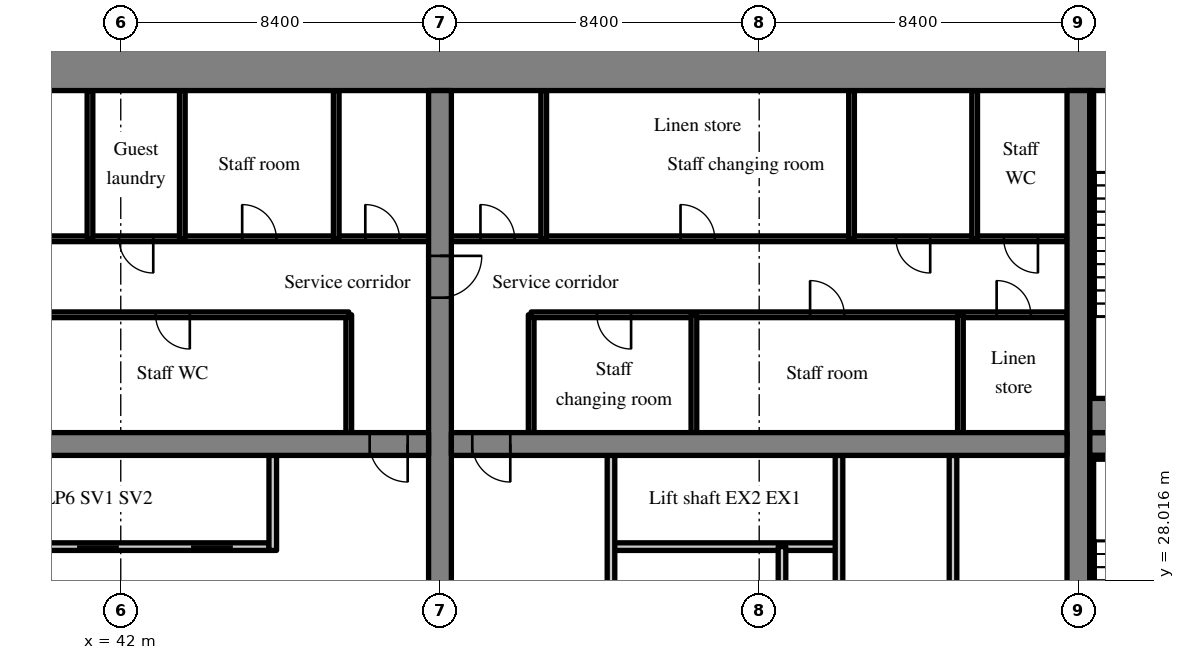
"""IFC4 building model, lengths in metres.
Left out: names, types, materials, properties, quantities, classifications, styles, units other than length and angle.
Written with IfcOpenShell. Run it as: python <this file> out.ifc"""

import sys

from ifc_helpers import new_model, si_unit, direction, frame, frame_2d, origin, place, context, subcontext, project, spatial, rectangle, extrude, source, transform, mapped, element, fill, save


model = new_model("IFC4")
c1 = context("Model", 3, precision=1e-05, world=origin(), true_north=direction((0.0, 1.0)))
c2 = subcontext(c1, "Body", "Model", "MODEL_VIEW")
j1 = project(units=[si_unit("LENGTHUNIT", "METRE"), si_unit("PLANEANGLEUNIT", "RADIAN")], contexts=[c1])
p1 = place(None, origin())
s1 = spatial("IfcSite", under=j1, at=p1, CompositionType="ELEMENT")
p2 = place(p1, origin())
s2 = spatial("IfcBuilding", under=s1, at=p2, CompositionType="ELEMENT")
p3 = place(p2, frame((0.0, 0.0, 11.4)))
s3 = spatial("IfcBuildingStorey", under=s2, at=p3, CompositionType="ELEMENT", Elevation=11.4)
m1 = source(origin(), c2, "Body", "SweptSolid", [
    extrude(rectangle(XDim=50.4, YDim=1.1, at=frame_2d((25.2, 0.0))), origin(), (0.0, 0.0, 1.0), 6.32),
])
p4 = place(p3, frame((25.2, 41.45, 0.0), z_axis=(0.0, 0.0, 1.0), x_axis=(1.0, 0.0, 0.0)))
e1 = element("IfcWall", 1, at=p4, inside=s3, PredefinedType="SHEAR", context=c2, shape_type="MappedRepresentation", body=[
    mapped(m1, transform((0.0, 0.0, 0.0), scale=1.0)),
])
m2 = source(origin(), c2, "Body", "SweptSolid", [
    extrude(rectangle(XDim=17.8, YDim=0.6, at=frame_2d((8.9, 0.0))), origin(), (0.0, 0.0, 1.0), 6.32),
])
p5 = place(p3, frame((50.4, 23.1, 0.0), z_axis=(0.0, 0.0, 1.0), x_axis=(0.0, 1.0, 0.0)))
e2 = element("IfcWall", 2, at=p5, inside=s3, PredefinedType="SHEAR", context=c2, shape_type="MappedRepresentation", body=[
    mapped(m2, transform((0.0, 0.0, 0.0), scale=1.0)),
])
m3 = source(origin(), c2, "Body", "SweptSolid", [
    extrude(rectangle(XDim=1.1, YDim=2.1, at=frame_2d((0.55, 1.05))), frame((0.0, 0.31, 0.0), z_axis=(0.0, -1.0, 0.0), x_axis=(1.0, 0.0, 0.0)), (0.0, 0.0, 1.0), 0.62),
])
p6 = place(p5, frame((12.35, 0.0, 0.0)))
e3 = element("IfcOpeningElement", 3, at=p6, cuts=e2, PredefinedType="OPENING", context=c2, shape_type="MappedRepresentation", body=[
    mapped(m3, transform((0.0, 0.0, 0.0), scale=1.0)),
])
p7 = place(p3, frame((67.2, 23.1, 0.0), z_axis=(0.0, 0.0, 1.0), x_axis=(0.0, 1.0, 0.0)))
e4 = element("IfcWall", 4, at=p7, inside=s3, PredefinedType="SHEAR", context=c2, shape_type="MappedRepresentation", body=[
    mapped(m2, transform((0.0, 0.0, 0.0), scale=1.0)),
])
m4 = source(origin(), c2, "Body", "SweptSolid", [
    extrude(rectangle(XDim=16.2, YDim=0.6, at=frame_2d((8.1, 0.0))), origin(), (0.0, 0.0, 1.0), 6.32),
])
p8 = place(p3, frame((33.9, 31.6, 0.0), z_axis=(0.0, 0.0, 1.0), x_axis=(1.0, 0.0, 0.0)))
e5 = element("IfcWall", 5, at=p8, inside=s3, PredefinedType="SHEAR", context=c2, shape_type="MappedRepresentation", body=[
    mapped(m4, transform((0.0, 0.0, 0.0), scale=1.0)),
])
m5 = source(origin(), c2, "Body", "SweptSolid", [
    extrude(rectangle(XDim=1.0, YDim=2.1, at=frame_2d((0.5, 1.05))), frame((0.0, 0.31, 0.0), z_axis=(0.0, -1.0, 0.0), x_axis=(1.0, 0.0, 0.0)), (0.0, 0.0, 1.0), 0.62),
])
p9 = place(p8, frame((14.65, 0.0, 0.0)))
e6 = element("IfcOpeningElement", 6, at=p9, cuts=e5, PredefinedType="OPENING", context=c2, shape_type="MappedRepresentation", body=[
    mapped(m5, transform((0.0, 0.0, 0.0), scale=1.0)),
])
m6 = source(origin(), c2, "Body", "SweptSolid", [
    extrude(rectangle(XDim=16.2, YDim=0.6, at=frame_2d((8.1, 0.0))), origin(), (0.0, 0.0, 1.0), 6.32),
])
p10 = place(p3, frame((50.7, 31.6, 0.0), z_axis=(0.0, 0.0, 1.0), x_axis=(1.0, 0.0, 0.0)))
e7 = element("IfcWall", 7, at=p10, inside=s3, PredefinedType="SHEAR", context=c2, shape_type="MappedRepresentation", body=[
    mapped(m6, transform((0.0, 0.0, 0.0), scale=1.0)),
])
p11 = place(p10, frame((0.55, 0.0, 0.0)))
e8 = element("IfcOpeningElement", 8, at=p11, cuts=e7, PredefinedType="OPENING", context=c2, shape_type="MappedRepresentation", body=[
    mapped(m5, transform((0.0, 0.0, 0.0), scale=1.0)),
])
m7 = source(origin(), c2, "Body", "SweptSolid", [
    extrude(rectangle(XDim=7.0, YDim=0.6, at=frame_2d((3.5, 0.0))), origin(), (0.0, 0.0, 1.0), 6.32),
])
p12 = place(p3, frame((67.5, 31.6, 0.0), z_axis=(0.0, 0.0, 1.0), x_axis=(1.0, 0.0, 0.0)))
e9 = element("IfcWall", 9, at=p12, inside=s3, PredefinedType="SHEAR", context=c2, shape_type="MappedRepresentation", body=[
    mapped(m7, transform((0.0, 0.0, 0.0), scale=1.0)),
])
p13 = place(p12, frame((5.425, 0.0, 0.0)))
e10 = element("IfcOpeningElement", 10, at=p13, cuts=e9, PredefinedType="OPENING", context=c2, shape_type="MappedRepresentation", body=[
    mapped(m3, transform((0.0, 0.0, 0.0), scale=1.0)),
])
m8 = source(origin(), c2, "Body", "SweptSolid", [
    extrude(rectangle(XDim=12.0, YDim=0.2, at=frame_2d((6.0, 0.0))), origin(), (0.0, 0.0, 1.0), 6.32),
])
p14 = place(p3, frame((33.9, 28.9, 0.0), z_axis=(0.0, 0.0, 1.0), x_axis=(1.0, 0.0, 0.0)))
e11 = element("IfcWall", 11, at=p14, inside=s3, PredefinedType="SOLIDWALL", context=c2, shape_type="MappedRepresentation", body=[
    mapped(m8, transform((0.0, 0.0, 0.0), scale=1.0)),
])
m9 = source(origin(), c2, "Body", "SweptSolid", [
    extrude(rectangle(XDim=1.1, YDim=2.1, at=frame_2d((0.55, 1.05))), frame((0.0, 0.11, 0.0), z_axis=(0.0, -1.0, 0.0), x_axis=(1.0, 0.0, 0.0)), (0.0, 0.0, 1.0), 0.22),
])
p15 = place(p14, frame((0.95, 0.0, 0.0)))
e12 = element("IfcOpeningElement", 12, at=p15, cuts=e11, PredefinedType="OPENING", context=c2, shape_type="MappedRepresentation", body=[
    mapped(m9, transform((0.0, 0.0, 0.0), scale=1.0)),
])
p16 = place(p14, frame((3.95, 0.0, 0.0)))
e13 = element("IfcOpeningElement", 13, at=p16, cuts=e11, PredefinedType="OPENING", context=c2, shape_type="MappedRepresentation", body=[
    mapped(m9, transform((0.0, 0.0, 0.0), scale=1.0)),
])
p17 = place(p14, frame((6.95, 0.0, 0.0)))
e14 = element("IfcOpeningElement", 14, at=p17, cuts=e11, PredefinedType="OPENING", context=c2, shape_type="MappedRepresentation", body=[
    mapped(m9, transform((0.0, 0.0, 0.0), scale=1.0)),
])
p18 = place(p14, frame((9.95, 0.0, 0.0)))
e15 = element("IfcOpeningElement", 15, at=p18, cuts=e11, PredefinedType="OPENING", context=c2, shape_type="MappedRepresentation", body=[
    mapped(m9, transform((0.0, 0.0, 0.0), scale=1.0)),
])
m10 = source(origin(), c2, "Body", "SweptSolid", [
    extrude(rectangle(XDim=2.5, YDim=0.2, at=frame_2d((1.25, 0.0))), origin(), (0.0, 0.0, 1.0), 6.32),
])
p19 = place(p3, frame((46.0, 28.8, 0.0), z_axis=(0.0, 0.0, 1.0), x_axis=(0.0, 1.0, 0.0)))
e16 = element("IfcWall", 16, at=p19, inside=s3, PredefinedType="SOLIDWALL", context=c2, shape_type="MappedRepresentation", body=[
    mapped(m10, transform((0.0, 0.0, 0.0), scale=1.0)),
])
m11 = source(origin(), c2, "Body", "SweptSolid", [
    extrude(rectangle(XDim=3.1, YDim=0.15, at=frame_2d((1.55, 0.0))), origin(), (0.0, 0.0, 1.0), 6.32),
])
p20 = place(p3, frame((48.0, 31.9, 0.0), z_axis=(0.0, 0.0, 1.0), x_axis=(0.0, 1.0, 0.0)))
e17 = element("IfcWall", 17, at=p20, inside=s3, PredefinedType="PARTITIONING", context=c2, shape_type="MappedRepresentation", body=[
    mapped(m11, transform((0.0, 0.0, 0.0), scale=1.0)),
])
m12 = source(origin(), c2, "Body", "SweptSolid", [
    extrude(rectangle(XDim=14.1, YDim=0.15, at=frame_2d((7.05, 0.0))), origin(), (0.0, 0.0, 1.0), 6.32),
])
p21 = place(p3, frame((33.9, 35.0, 0.0), z_axis=(0.0, 0.0, 1.0), x_axis=(1.0, 0.0, 0.0)))
e18 = element("IfcWall", 18, at=p21, inside=s3, PredefinedType="PARTITIONING", context=c2, shape_type="MappedRepresentation", body=[
    mapped(m12, transform((0.0, 0.0, 0.0), scale=1.0)),
])
m13 = source(origin(), c2, "Body", "SweptSolid", [
    extrude(rectangle(XDim=0.9, YDim=2.1, at=frame_2d((0.45, 1.05))), frame((0.0, 0.085, 0.0), z_axis=(0.0, -1.0, 0.0), x_axis=(1.0, 0.0, 0.0)), (0.0, 0.0, 1.0), 0.17),
])
p22 = place(p21, frame((2.004, 0.0, 0.0)))
e19 = element("IfcOpeningElement", 19, at=p22, cuts=e18, PredefinedType="OPENING", context=c2, shape_type="MappedRepresentation", body=[
    mapped(m13, transform((0.0, 0.0, 0.0), scale=1.0)),
])
p23 = place(p21, frame((9.017, 0.0, 0.0)))
e20 = element("IfcOpeningElement", 20, at=p23, cuts=e18, PredefinedType="OPENING", context=c2, shape_type="MappedRepresentation", body=[
    mapped(m13, transform((0.0, 0.0, 0.0), scale=1.0)),
])
m14 = source(origin(), c2, "Body", "SweptSolid", [
    extrude(rectangle(XDim=16.2, YDim=0.15, at=frame_2d((8.1, 0.0))), origin(), (0.0, 0.0, 1.0), 6.32),
])
p24 = place(p3, frame((33.9, 37.0, 0.0), z_axis=(0.0, 0.0, 1.0), x_axis=(1.0, 0.0, 0.0)))
e21 = element("IfcWall", 21, at=p24, inside=s3, PredefinedType="PARTITIONING", context=c2, shape_type="MappedRepresentation", body=[
    mapped(m14, transform((0.0, 0.0, 0.0), scale=1.0)),
])
p25 = place(p24, frame((3.195, 0.0, 0.0)))
e22 = element("IfcOpeningElement", 22, at=p25, cuts=e21, PredefinedType="OPENING", context=c2, shape_type="MappedRepresentation", body=[
    mapped(m13, transform((0.0, 0.0, 0.0), scale=1.0)),
])
p26 = place(p24, frame((8.055, 0.0, 0.0)))
e23 = element("IfcOpeningElement", 23, at=p26, cuts=e21, PredefinedType="OPENING", context=c2, shape_type="MappedRepresentation", body=[
    mapped(m13, transform((0.0, 0.0, 0.0), scale=1.0)),
])
p27 = place(p24, frame((11.295, 0.0, 0.0)))
e24 = element("IfcOpeningElement", 24, at=p27, cuts=e21, PredefinedType="OPENING", context=c2, shape_type="MappedRepresentation", body=[
    mapped(m13, transform((0.0, 0.0, 0.0), scale=1.0)),
])
p28 = place(p24, frame((14.535, 0.0, 0.0)))
e25 = element("IfcOpeningElement", 25, at=p28, cuts=e21, PredefinedType="OPENING", context=c2, shape_type="MappedRepresentation", body=[
    mapped(m13, transform((0.0, 0.0, 0.0), scale=1.0)),
])
m15 = source(origin(), c2, "Body", "SweptSolid", [
    extrude(rectangle(XDim=3.9, YDim=0.15, at=frame_2d((1.95, 0.0))), origin(), (0.0, 0.0, 1.0), 6.32),
])
for number, where, z_axis, x_axis in (
    (26, (41.19, 37.0, 0.0), (0.0, 0.0, 1.0), (0.0, 1.0, 0.0)),
    (27, (43.62, 37.0, 0.0), (0.0, 0.0, 1.0), (0.0, 1.0, 0.0)),
    (28, (47.67, 37.0, 0.0), (0.0, 0.0, 1.0), (0.0, 1.0, 0.0)),
):
    element("IfcWall", number, at=place(p3, frame(where, z_axis=z_axis, x_axis=x_axis)), inside=s3, PredefinedType="PARTITIONING", context=c2, shape_type="MappedRepresentation", body=[
        mapped(m15, transform((0.0, 0.0, 0.0), scale=1.0)),
    ])
m16 = source(origin(), c2, "Body", "SweptSolid", [
    extrude(rectangle(XDim=6.0, YDim=0.2, at=frame_2d((3.0, 0.0))), origin(), (0.0, 0.0, 1.0), 6.32),
])
p29 = place(p3, frame((60.9, 28.9, 0.0), z_axis=(0.0, 0.0, 1.0), x_axis=(-1.0, 0.0, 0.0)))
e29 = element("IfcWall", 29, at=p29, inside=s3, PredefinedType="SOLIDWALL", context=c2, shape_type="MappedRepresentation", body=[
    mapped(m16, transform((0.0, 0.0, 0.0), scale=1.0)),
])
m17 = source(origin(), c2, "Body", "SweptSolid", [
    extrude(rectangle(XDim=8.2, YDim=0.2, at=frame_2d((4.1, 0.0))), origin(), (0.0, 0.0, 1.0), 6.32),
])
for number, where, z_axis, x_axis in (
    (30, (54.9, 23.1, 0.0), (0.0, 0.0, 1.0), (0.0, 1.0, 0.0)),
    (31, (60.9, 23.1, 0.0), (0.0, 0.0, 1.0), (0.0, 1.0, 0.0)),
):
    element("IfcWall", number, at=place(p3, frame(where, z_axis=z_axis, x_axis=x_axis)), inside=s3, PredefinedType="PARTITIONING", context=c2, shape_type="MappedRepresentation", body=[
        mapped(m17, transform((0.0, 0.0, 0.0), scale=1.0)),
    ])
m18 = source(origin(), c2, "Body", "SweptSolid", [
    extrude(rectangle(XDim=5.8, YDim=0.2, at=frame_2d((2.9, 0.0))), origin(), (0.0, 0.0, 1.0), 6.32),
])
p30 = place(p3, frame((59.4, 23.1, 0.0), z_axis=(0.0, 0.0, 1.0), x_axis=(0.0, 1.0, 0.0)))
e32 = element("IfcWall", 32, at=p30, inside=s3, PredefinedType="PARTITIONING", context=c2, shape_type="MappedRepresentation", body=[
    mapped(m18, transform((0.0, 0.0, 0.0), scale=1.0)),
])
p31 = place(p3, frame((63.9, 23.1, 0.0), z_axis=(0.0, 0.0, 1.0), x_axis=(0.0, 1.0, 0.0)))
e33 = element("IfcWall", 33, at=p31, inside=s3, PredefinedType="PARTITIONING", context=c2, shape_type="MappedRepresentation", body=[
    mapped(m17, transform((0.0, 0.0, 0.0), scale=1.0)),
])
p32 = place(p3, frame((52.8, 31.9, 0.0), z_axis=(0.0, 0.0, 1.0), x_axis=(0.0, 1.0, 0.0)))
e34 = element("IfcWall", 34, at=p32, inside=s3, PredefinedType="PARTITIONING", context=c2, shape_type="MappedRepresentation", body=[
    mapped(m11, transform((0.0, 0.0, 0.0), scale=1.0)),
])
m19 = source(origin(), c2, "Body", "SweptSolid", [
    extrude(rectangle(XDim=14.1, YDim=0.15, at=frame_2d((7.05, 0.0))), origin(), (0.0, 0.0, 1.0), 6.32),
])
p33 = place(p3, frame((66.9, 35.0, 0.0), z_axis=(0.0, 0.0, 1.0), x_axis=(-1.0, 0.0, 0.0)))
e35 = element("IfcWall", 35, at=p33, inside=s3, PredefinedType="PARTITIONING", context=c2, shape_type="MappedRepresentation", body=[
    mapped(m19, transform((0.0, 0.0, 0.0), scale=1.0)),
])
p34 = place(p33, frame((0.952, 0.0, 0.0)))
e36 = element("IfcOpeningElement", 36, at=p34, cuts=e35, PredefinedType="OPENING", context=c2, shape_type="MappedRepresentation", body=[
    mapped(m13, transform((0.0, 0.0, 0.0), scale=1.0)),
])
p35 = place(p33, frame((5.861, 0.0, 0.0)))
e37 = element("IfcOpeningElement", 37, at=p35, cuts=e35, PredefinedType="OPENING", context=c2, shape_type="MappedRepresentation", body=[
    mapped(m13, transform((0.0, 0.0, 0.0), scale=1.0)),
])
p36 = place(p33, frame((11.471, 0.0, 0.0)))
e38 = element("IfcOpeningElement", 38, at=p36, cuts=e35, PredefinedType="OPENING", context=c2, shape_type="MappedRepresentation", body=[
    mapped(m13, transform((0.0, 0.0, 0.0), scale=1.0)),
])
m20 = source(origin(), c2, "Body", "SweptSolid", [
    extrude(rectangle(XDim=16.2, YDim=0.15, at=frame_2d((8.1, 0.0))), origin(), (0.0, 0.0, 1.0), 6.32),
])
p37 = place(p3, frame((66.9, 37.0, 0.0), z_axis=(0.0, 0.0, 1.0), x_axis=(-1.0, 0.0, 0.0)))
e39 = element("IfcWall", 39, at=p37, inside=s3, PredefinedType="PARTITIONING", context=c2, shape_type="MappedRepresentation", body=[
    mapped(m20, transform((0.0, 0.0, 0.0), scale=1.0)),
])
p38 = place(p37, frame((0.765, 0.0, 0.0)))
e40 = element("IfcOpeningElement", 40, at=p38, cuts=e39, PredefinedType="OPENING", context=c2, shape_type="MappedRepresentation", body=[
    mapped(m13, transform((0.0, 0.0, 0.0), scale=1.0)),
])
p39 = place(p37, frame((3.6, 0.0, 0.0)))
e41 = element("IfcOpeningElement", 41, at=p39, cuts=e39, PredefinedType="OPENING", context=c2, shape_type="MappedRepresentation", body=[
    mapped(m13, transform((0.0, 0.0, 0.0), scale=1.0)),
])
p40 = place(p37, frame((9.27, 0.0, 0.0)))
e42 = element("IfcOpeningElement", 42, at=p40, cuts=e39, PredefinedType="OPENING", context=c2, shape_type="MappedRepresentation", body=[
    mapped(m13, transform((0.0, 0.0, 0.0), scale=1.0)),
])
p41 = place(p37, frame((14.535, 0.0, 0.0)))
e43 = element("IfcOpeningElement", 43, at=p41, cuts=e39, PredefinedType="OPENING", context=c2, shape_type="MappedRepresentation", body=[
    mapped(m13, transform((0.0, 0.0, 0.0), scale=1.0)),
])
for number, where, z_axis, x_axis in (
    (44, (64.095, 31.9, 0.0), (0.0, 0.0, 1.0), (0.0, 1.0, 0.0)),
    (45, (57.082, 31.9, 0.0), (0.0, 0.0, 1.0), (0.0, 1.0, 0.0)),
):
    element("IfcWall", number, at=place(p3, frame(where, z_axis=z_axis, x_axis=x_axis)), inside=s3, PredefinedType="PARTITIONING", context=c2, shape_type="MappedRepresentation", body=[
        mapped(m11, transform((0.0, 0.0, 0.0), scale=1.0)),
    ])
for number, where, z_axis, x_axis in (
    (46, (64.47, 37.0, 0.0), (0.0, 0.0, 1.0), (0.0, 1.0, 0.0)),
    (47, (61.23, 37.0, 0.0), (0.0, 0.0, 1.0), (0.0, 1.0, 0.0)),
    (48, (53.13, 37.0, 0.0), (0.0, 0.0, 1.0), (0.0, 1.0, 0.0)),
):
    element("IfcWall", number, at=place(p3, frame(where, z_axis=z_axis, x_axis=x_axis)), inside=s3, PredefinedType="PARTITIONING", context=c2, shape_type="MappedRepresentation", body=[
        mapped(m15, transform((0.0, 0.0, 0.0), scale=1.0)),
    ])
m21 = source(origin(), c2, "Body", "SweptSolid", [
    extrude(rectangle(XDim=4.75, YDim=0.1, at=frame_2d((2.375, 0.0))), origin(), (0.0, 0.0, 1.0), 6.32),
])
p42 = place(p3, frame((67.5, 31.25, 0.0), z_axis=(0.0, 0.0, 1.0), x_axis=(1.0, 0.0, 0.0)))
e49 = element("IfcWall", 49, at=p42, inside=s3, PredefinedType="SOLIDWALL", context=c2, shape_type="MappedRepresentation", body=[
    mapped(m21, transform((0.0, 0.0, 0.0), scale=1.0)),
])
m22 = source(origin(), c2, "Body", "SweptSolid", [
    extrude(rectangle(XDim=8.1, YDim=0.1, at=frame_2d((4.05, 0.0))), origin(), (0.0, 0.0, 1.0), 6.32),
])
p43 = place(p3, frame((67.55, 23.1, 0.0), z_axis=(0.0, 0.0, 1.0), x_axis=(0.0, 1.0, 0.0)))
e50 = element("IfcWall", 50, at=p43, inside=s3, PredefinedType="SOLIDWALL", context=c2, shape_type="MappedRepresentation", body=[
    mapped(m22, transform((0.0, 0.0, 0.0), scale=1.0)),
])
m23 = source(origin(), c2, "Body", "SweptSolid", [
    extrude(rectangle(XDim=4.75, YDim=0.9, at=frame_2d((2.375, 0.0))), origin(), (0.0, 0.0, 1.0), 6.32),
])
p44 = place(p3, frame((67.5, 32.35, 0.0), z_axis=(0.0, 0.0, 1.0), x_axis=(1.0, 0.0, 0.0)))
e51 = element("IfcWall", 51, at=p44, inside=s3, PredefinedType="SOLIDWALL", context=c2, shape_type="MappedRepresentation", body=[
    mapped(m23, transform((0.0, 0.0, 0.0), scale=1.0)),
])
p45 = place(p3, frame((67.55, 32.8, 0.0), z_axis=(0.0, 0.0, 1.0), x_axis=(0.0, 1.0, 0.0)))
e52 = element("IfcWall", 52, at=p45, inside=s3, PredefinedType="SOLIDWALL", context=c2, shape_type="MappedRepresentation", body=[
    mapped(m22, transform((0.0, 0.0, 0.0), scale=1.0)),
])
m24 = source(origin(), c2, "Body", "SweptSolid", [
    extrude(rectangle(XDim=1.0, YDim=2.1, at=frame_2d((0.5, 1.05))), frame((0.0, 0.025, 0.0), z_axis=(0.0, -1.0, 0.0), x_axis=(1.0, 0.0, 0.0)), (0.0, 0.0, 1.0), 0.05),
])
p46 = place(p9, origin())
e53 = element("IfcDoor", 53, at=p46, inside=s3, OperationType="SINGLE_SWING_RIGHT", PredefinedType="DOOR", context=c2, shape_type="MappedRepresentation", body=[
    mapped(m24, transform((0.0, 0.0, 0.0), scale=1.0)),
])
fill(e6, e53)
m25 = source(origin(), c2, "Body", "SweptSolid", [
    extrude(rectangle(XDim=1.1, YDim=2.1, at=frame_2d((0.55, 1.05))), frame((0.0, 0.025, 0.0), z_axis=(0.0, -1.0, 0.0), x_axis=(1.0, 0.0, 0.0)), (0.0, 0.0, 1.0), 0.05),
])
p47 = place(p17, origin())
e54 = element("IfcDoor", 54, at=p47, inside=s3, OperationType="SLIDING_TO_LEFT", PredefinedType="DOOR", context=c2, shape_type="MappedRepresentation", body=[
    mapped(m25, transform((0.0, 0.0, 0.0), scale=1.0)),
])
fill(e14, e54)
p48 = place(p18, origin())
e55 = element("IfcDoor", 55, at=p48, inside=s3, OperationType="SLIDING_TO_RIGHT", PredefinedType="DOOR", context=c2, shape_type="MappedRepresentation", body=[
    mapped(m25, transform((0.0, 0.0, 0.0), scale=1.0)),
])
fill(e15, e55)
m26 = source(origin(), c2, "Body", "SweptSolid", [
    extrude(rectangle(XDim=0.9, YDim=2.1, at=frame_2d((0.45, 1.05))), frame((0.0, 0.025, 0.0), z_axis=(0.0, -1.0, 0.0), x_axis=(1.0, 0.0, 0.0)), (0.0, 0.0, 1.0), 0.05),
])
p49 = place(p23, origin())
e56 = element("IfcDoor", 56, at=p49, inside=s3, OperationType="SINGLE_SWING_RIGHT", PredefinedType="DOOR", context=c2, shape_type="MappedRepresentation", body=[
    mapped(m26, transform((0.0, 0.0, 0.0), scale=1.0)),
])
fill(e20, e56)
p50 = place(p26, origin())
e57 = element("IfcDoor", 57, at=p50, inside=s3, OperationType="SINGLE_SWING_RIGHT", PredefinedType="DOOR", context=c2, shape_type="MappedRepresentation", body=[
    mapped(m26, transform((0.0, 0.0, 0.0), scale=1.0)),
])
fill(e23, e57)
p51 = place(p27, origin())
e58 = element("IfcDoor", 58, at=p51, inside=s3, OperationType="SINGLE_SWING_LEFT", PredefinedType="DOOR", context=c2, shape_type="MappedRepresentation", body=[
    mapped(m26, transform((0.0, 0.0, 0.0), scale=1.0)),
])
fill(e24, e58)
p52 = place(p28, origin())
e59 = element("IfcDoor", 59, at=p52, inside=s3, OperationType="SINGLE_SWING_LEFT", PredefinedType="DOOR", context=c2, shape_type="MappedRepresentation", body=[
    mapped(m26, transform((0.0, 0.0, 0.0), scale=1.0)),
])
fill(e25, e59)
p53 = place(p11, origin())
e60 = element("IfcDoor", 60, at=p53, inside=s3, OperationType="SINGLE_SWING_RIGHT", PredefinedType="DOOR", context=c2, shape_type="MappedRepresentation", body=[
    mapped(m24, transform((0.0, 0.0, 0.0), scale=1.0)),
])
fill(e8, e60)
p54 = place(p34, origin())
e61 = element("IfcDoor", 61, at=p54, inside=s3, OperationType="SINGLE_SWING_RIGHT", PredefinedType="DOOR", context=c2, shape_type="MappedRepresentation", body=[
    mapped(m26, transform((0.0, 0.0, 0.0), scale=1.0)),
])
fill(e36, e61)
p55 = place(p35, origin())
e62 = element("IfcDoor", 62, at=p55, inside=s3, OperationType="SINGLE_SWING_RIGHT", PredefinedType="DOOR", context=c2, shape_type="MappedRepresentation", body=[
    mapped(m26, transform((0.0, 0.0, 0.0), scale=1.0)),
])
fill(e37, e62)
p56 = place(p36, origin())
e63 = element("IfcDoor", 63, at=p56, inside=s3, OperationType="SINGLE_SWING_LEFT", PredefinedType="DOOR", context=c2, shape_type="MappedRepresentation", body=[
    mapped(m26, transform((0.0, 0.0, 0.0), scale=1.0)),
])
fill(e38, e63)
p57 = place(p38, origin())
e64 = element("IfcDoor", 64, at=p57, inside=s3, OperationType="SINGLE_SWING_LEFT", PredefinedType="DOOR", context=c2, shape_type="MappedRepresentation", body=[
    mapped(m26, transform((0.0, 0.0, 0.0), scale=1.0)),
])
fill(e40, e64)
p58 = place(p39, origin())
e65 = element("IfcDoor", 65, at=p58, inside=s3, OperationType="SINGLE_SWING_LEFT", PredefinedType="DOOR", context=c2, shape_type="MappedRepresentation", body=[
    mapped(m26, transform((0.0, 0.0, 0.0), scale=1.0)),
])
fill(e41, e65)
p59 = place(p40, origin())
e66 = element("IfcDoor", 66, at=p59, inside=s3, OperationType="SINGLE_SWING_RIGHT", PredefinedType="DOOR", context=c2, shape_type="MappedRepresentation", body=[
    mapped(m26, transform((0.0, 0.0, 0.0), scale=1.0)),
])
fill(e42, e66)
p60 = place(p41, origin())
e67 = element("IfcDoor", 67, at=p60, inside=s3, OperationType="SINGLE_SWING_RIGHT", PredefinedType="DOOR", context=c2, shape_type="MappedRepresentation", body=[
    mapped(m26, transform((0.0, 0.0, 0.0), scale=1.0)),
])
fill(e43, e67)
p61 = place(p6, origin())
e68 = element("IfcDoor", 68, at=p61, inside=s3, OperationType="SINGLE_SWING_RIGHT", PredefinedType="DOOR", context=c2, shape_type="MappedRepresentation", body=[
    mapped(m25, transform((0.0, 0.0, 0.0), scale=1.0)),
])
fill(e3, e68)
save(model, sys.argv[1])
